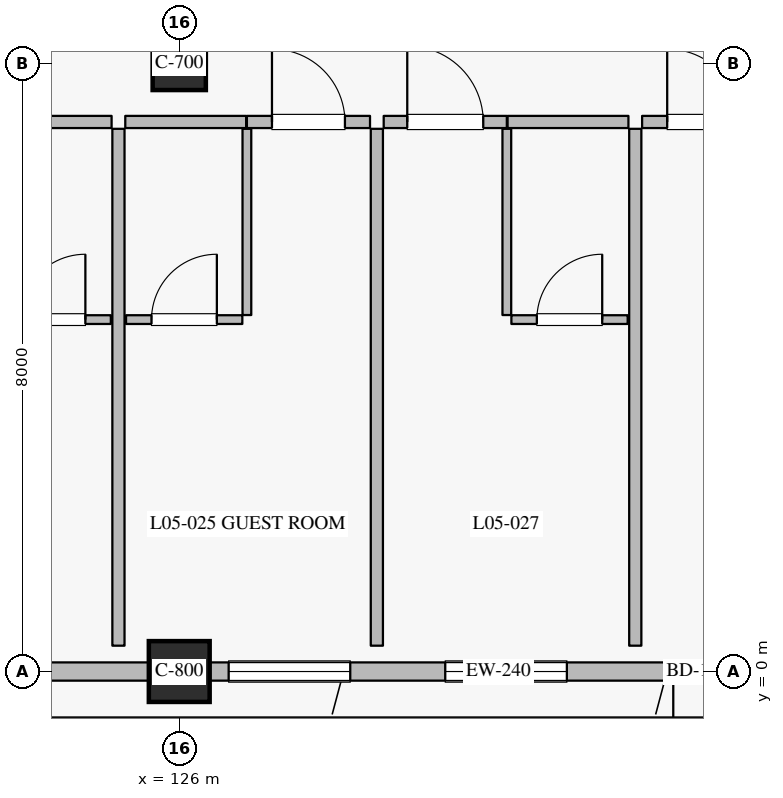
"""IFC4 building model, lengths in metres.
Left out: names, types, materials, properties, quantities, classifications, styles, units other than length and angle.
Written with IfcOpenShell. Run it as: python <this file> out.ifc"""

import sys

from ifc_helpers import new_model, si_unit, direction, frame, frame_2d, origin, origin_2d, place, context, subcontext, project, spatial, rectangle, extrude, element, fill, save


model = new_model("IFC4")
c1 = context("Model", 3, precision=1e-05, world=origin(), true_north=direction((0.0, 1.0)))
c2 = subcontext(c1, "Body", "Model", "MODEL_VIEW")
j1 = project(units=[si_unit("LENGTHUNIT", "METRE"), si_unit("PLANEANGLEUNIT", "RADIAN")], contexts=[c1])
p1 = place(None, origin())
s1 = spatial("IfcSite", under=j1, at=p1, CompositionType="ELEMENT")
p2 = place(p1, origin())
s2 = spatial("IfcBuilding", under=s1, at=p2, CompositionType="ELEMENT")
p3 = place(p2, frame((0.0, 0.0, 25.2)))
s3 = spatial("IfcBuildingStorey", under=s2, at=p3, CompositionType="ELEMENT", Elevation=25.2)
p4 = place(p3, frame((126.0, 0.0, 0.0), z_axis=(0.0, 0.0, 1.0), x_axis=(1.0, 0.0, 0.0)))
e1 = element("IfcColumn", 1, at=p4, inside=s3, PredefinedType="COLUMN", context=c2, shape_type="SweptSolid", body=[
    extrude(rectangle(XDim=0.8, YDim=0.8, at=origin_2d()), origin(), (0.0, 0.0, 1.0), 3.6),
])
p5 = place(p3, frame((126.0, 8.0, 0.0), z_axis=(0.0, 0.0, 1.0), x_axis=(1.0, 0.0, 0.0)))
e2 = element("IfcColumn", 2, at=p5, inside=s3, PredefinedType="COLUMN", context=c2, shape_type="SweptSolid", body=[
    extrude(rectangle(XDim=0.7, YDim=0.7, at=origin_2d()), origin(), (0.0, 0.0, 1.0), 3.6),
])
p6 = place(p3, frame((125.6, 0.0, 0.0), z_axis=(0.0, 0.0, 1.0), x_axis=(-1.0, 0.0, 0.0)))
e3 = element("IfcWall", 3, at=p6, inside=s3, PredefinedType="SOLIDWALL", context=c2, shape_type="SweptSolid", body=[
    extrude(rectangle(XDim=7.6, YDim=0.24, at=frame_2d((3.8, 0.0))), origin(), (0.0, 0.0, 1.0), 2.93),
])
p7 = place(p6, frame((1.35, 0.0, 0.0)))
e4 = element("IfcOpeningElement", 4, at=p7, cuts=e3, PredefinedType="OPENING", context=c2, shape_type="SweptSolid", body=[
    extrude(rectangle(XDim=1.5, YDim=2.25, at=frame_2d((0.75, 1.125))), frame((0.0, 0.13, 0.0), z_axis=(0.0, -1.0, 0.0), x_axis=(1.0, 0.0, 0.0)), (0.0, 0.0, 1.0), 0.26),
])
p8 = place(p6, frame((4.7, 0.0, 0.8)))
e5 = element("IfcOpeningElement", 5, at=p8, cuts=e3, PredefinedType="OPENING", context=c2, shape_type="SweptSolid", body=[
    extrude(rectangle(XDim=1.6, YDim=1.6, at=frame_2d((0.8, 0.8))), frame((0.0, 0.13, 0.0), z_axis=(0.0, -1.0, 0.0), x_axis=(1.0, 0.0, 0.0)), (0.0, 0.0, 1.0), 0.26),
])
p9 = place(p3, frame((134.0, 0.0, 0.0), z_axis=(0.0, 0.0, 1.0), x_axis=(-1.0, 0.0, 0.0)))
e6 = element("IfcWall", 6, at=p9, inside=s3, PredefinedType="SOLIDWALL", context=c2, shape_type="SweptSolid", body=[
    extrude(rectangle(XDim=7.6, YDim=0.24, at=frame_2d((3.8, 0.0))), origin(), (0.0, 0.0, 1.0), 2.93),
])
p10 = place(p9, frame((0.4, 0.0, 0.0)))
e7 = element("IfcOpeningElement", 7, at=p10, cuts=e6, PredefinedType="OPENING", context=c2, shape_type="SweptSolid", body=[
    extrude(rectangle(XDim=1.1, YDim=2.2, at=frame_2d((0.55, 1.1))), frame((0.0, 0.13, 0.0), z_axis=(0.0, -1.0, 0.0), x_axis=(1.0, 0.0, 0.0)), (0.0, 0.0, 1.0), 0.26),
])
p11 = place(p9, frame((2.9, 0.0, 0.8)))
e8 = element("IfcOpeningElement", 8, at=p11, cuts=e6, PredefinedType="OPENING", context=c2, shape_type="SweptSolid", body=[
    extrude(rectangle(XDim=1.6, YDim=1.6, at=frame_2d((0.8, 0.8))), frame((0.0, 0.13, 0.0), z_axis=(0.0, -1.0, 0.0), x_axis=(1.0, 0.0, 0.0)), (0.0, 0.0, 1.0), 0.26),
])
p12 = place(p9, frame((5.75, 0.0, 0.8)))
e9 = element("IfcOpeningElement", 9, at=p12, cuts=e6, PredefinedType="OPENING", context=c2, shape_type="SweptSolid", body=[
    extrude(rectangle(XDim=1.6, YDim=1.6, at=frame_2d((0.8, 0.8))), frame((0.0, 0.13, 0.0), z_axis=(0.0, -1.0, 0.0), x_axis=(1.0, 0.0, 0.0)), (0.0, 0.0, 1.0), 0.26),
])
p13 = place(p3, frame((123.52, 7.23, 0.0), z_axis=(0.0, 0.0, 1.0), x_axis=(1.0, 0.0, 0.0)))
e10 = element("IfcWall", 10, at=p13, inside=s3, PredefinedType="PARTITIONING", context=c2, shape_type="SweptSolid", body=[
    extrude(rectangle(XDim=1.59, YDim=0.16, at=frame_2d((0.795, 0.0))), origin(), (0.0, 0.0, 1.0), 3.335),
])
p14 = place(p3, frame((123.57, 4.63, 0.0), z_axis=(0.0, 0.0, 1.0), x_axis=(1.0, 0.0, 0.0)))
e11 = element("IfcWall", 11, at=p14, inside=s3, PredefinedType="PARTITIONING", context=c2, shape_type="SweptSolid", body=[
    extrude(rectangle(XDim=1.53, YDim=0.115, at=frame_2d((0.765, 0.0))), origin(), (0.0, 0.0, 1.0), 3.335),
])
p15 = place(p14, frame((0.335, 0.0, 0.0)))
e12 = element("IfcOpeningElement", 12, at=p15, cuts=e11, PredefinedType="OPENING", context=c2, shape_type="SweptSolid", body=[
    extrude(rectangle(XDim=0.86, YDim=2.12, at=frame_2d((0.43, 1.06))), frame((0.0, 0.067, 0.0), z_axis=(0.0, -1.0, 0.0), x_axis=(1.0, 0.0, 0.0)), (0.0, 0.0, 1.0), 0.135),
])
p16 = place(p3, frame((125.29, 7.23, 0.0), z_axis=(0.0, 0.0, 1.0), x_axis=(1.0, 0.0, 0.0)))
e13 = element("IfcWall", 13, at=p16, inside=s3, PredefinedType="PARTITIONING", context=c2, shape_type="SweptSolid", body=[
    extrude(rectangle(XDim=1.59, YDim=0.16, at=frame_2d((0.795, 0.0))), origin(), (0.0, 0.0, 1.0), 3.335),
])
p17 = place(p3, frame((126.89, 7.23, 0.0), z_axis=(0.0, 0.0, 1.0), x_axis=(1.0, 0.0, 0.0)))
e14 = element("IfcWall", 14, at=p17, inside=s3, PredefinedType="PARTITIONING", context=c2, shape_type="SweptSolid", body=[
    extrude(rectangle(XDim=1.62, YDim=0.16, at=frame_2d((0.81, 0.0))), origin(), (0.0, 0.0, 1.0), 3.335),
])
p18 = place(p17, frame((0.33, 0.0, 0.0)))
e15 = element("IfcOpeningElement", 15, at=p18, cuts=e14, PredefinedType="OPENING", context=c2, shape_type="SweptSolid", body=[
    extrude(rectangle(XDim=0.96, YDim=2.2, at=frame_2d((0.48, 1.1))), frame((0.0, 0.09, 0.0), z_axis=(0.0, -1.0, 0.0), x_axis=(1.0, 0.0, 0.0)), (0.0, 0.0, 1.0), 0.18),
])
p19 = place(p3, frame((126.89, 4.69, 0.0), z_axis=(0.0, 0.0, 1.0), x_axis=(0.0, 1.0, 0.0)))
e16 = element("IfcWall", 16, at=p19, inside=s3, PredefinedType="PARTITIONING", context=c2, shape_type="SweptSolid", body=[
    extrude(rectangle(XDim=2.45, YDim=0.115, at=frame_2d((1.225, 0.0))), origin(), (0.0, 0.0, 1.0), 3.335),
])
p20 = place(p3, frame((125.3, 4.63, 0.0), z_axis=(0.0, 0.0, 1.0), x_axis=(1.0, 0.0, 0.0)))
e17 = element("IfcWall", 17, at=p20, inside=s3, PredefinedType="PARTITIONING", context=c2, shape_type="SweptSolid", body=[
    extrude(rectangle(XDim=1.53, YDim=0.115, at=frame_2d((0.765, 0.0))), origin(), (0.0, 0.0, 1.0), 3.335),
])
p21 = place(p20, frame((0.335, 0.0, 0.0)))
e18 = element("IfcOpeningElement", 18, at=p21, cuts=e17, PredefinedType="OPENING", context=c2, shape_type="SweptSolid", body=[
    extrude(rectangle(XDim=0.86, YDim=2.12, at=frame_2d((0.43, 1.06))), frame((0.0, 0.067, 0.0), z_axis=(0.0, -1.0, 0.0), x_axis=(1.0, 0.0, 0.0)), (0.0, 0.0, 1.0), 0.135),
])
p22 = place(p3, frame((125.2, 0.34, 0.0), z_axis=(0.0, 0.0, 1.0), x_axis=(0.0, 1.0, 0.0)))
e19 = element("IfcWall", 19, at=p22, inside=s3, PredefinedType="PARTITIONING", context=c2, shape_type="SweptSolid", body=[
    extrude(rectangle(XDim=6.8, YDim=0.16, at=frame_2d((3.4, 0.0))), origin(), (0.0, 0.0, 1.0), 3.335),
])
p23 = place(p3, frame((128.69, 7.23, 0.0), z_axis=(0.0, 0.0, 1.0), x_axis=(1.0, 0.0, 0.0)))
e20 = element("IfcWall", 20, at=p23, inside=s3, PredefinedType="PARTITIONING", context=c2, shape_type="SweptSolid", body=[
    extrude(rectangle(XDim=1.62, YDim=0.16, at=frame_2d((0.81, 0.0))), origin(), (0.0, 0.0, 1.0), 3.335),
])
p24 = place(p23, frame((0.31, 0.0, 0.0)))
e21 = element("IfcOpeningElement", 21, at=p24, cuts=e20, PredefinedType="OPENING", context=c2, shape_type="SweptSolid", body=[
    extrude(rectangle(XDim=1.0, YDim=2.25, at=frame_2d((0.5, 1.125))), frame((0.0, 0.09, 0.0), z_axis=(0.0, -1.0, 0.0), x_axis=(1.0, 0.0, 0.0)), (0.0, 0.0, 1.0), 0.18),
])
p25 = place(p3, frame((130.32, 7.23, 0.0), z_axis=(0.0, 0.0, 1.0), x_axis=(1.0, 0.0, 0.0)))
e22 = element("IfcWall", 22, at=p25, inside=s3, PredefinedType="PARTITIONING", context=c2, shape_type="SweptSolid", body=[
    extrude(rectangle(XDim=1.59, YDim=0.16, at=frame_2d((0.795, 0.0))), origin(), (0.0, 0.0, 1.0), 3.335),
])
p26 = place(p3, frame((130.31, 4.69, 0.0), z_axis=(0.0, 0.0, 1.0), x_axis=(0.0, 1.0, 0.0)))
e23 = element("IfcWall", 23, at=p26, inside=s3, PredefinedType="PARTITIONING", context=c2, shape_type="SweptSolid", body=[
    extrude(rectangle(XDim=2.45, YDim=0.115, at=frame_2d((1.225, 0.0))), origin(), (0.0, 0.0, 1.0), 3.335),
])
p27 = place(p3, frame((130.37, 4.63, 0.0), z_axis=(0.0, 0.0, 1.0), x_axis=(1.0, 0.0, 0.0)))
e24 = element("IfcWall", 24, at=p27, inside=s3, PredefinedType="PARTITIONING", context=c2, shape_type="SweptSolid", body=[
    extrude(rectangle(XDim=1.53, YDim=0.115, at=frame_2d((0.765, 0.0))), origin(), (0.0, 0.0, 1.0), 3.335),
])
p28 = place(p27, frame((0.335, 0.0, 0.0)))
e25 = element("IfcOpeningElement", 25, at=p28, cuts=e24, PredefinedType="OPENING", context=c2, shape_type="SweptSolid", body=[
    extrude(rectangle(XDim=0.86, YDim=2.12, at=frame_2d((0.43, 1.06))), frame((0.0, 0.067, 0.0), z_axis=(0.0, -1.0, 0.0), x_axis=(1.0, 0.0, 0.0)), (0.0, 0.0, 1.0), 0.135),
])
p29 = place(p3, frame((128.6, 0.34, 0.0), z_axis=(0.0, 0.0, 1.0), x_axis=(0.0, 1.0, 0.0)))
e26 = element("IfcWall", 26, at=p29, inside=s3, PredefinedType="PARTITIONING", context=c2, shape_type="SweptSolid", body=[
    extrude(rectangle(XDim=6.8, YDim=0.16, at=frame_2d((3.4, 0.0))), origin(), (0.0, 0.0, 1.0), 3.335),
])
p30 = place(p3, frame((132.09, 7.23, 0.0), z_axis=(0.0, 0.0, 1.0), x_axis=(1.0, 0.0, 0.0)))
e27 = element("IfcWall", 27, at=p30, inside=s3, PredefinedType="PARTITIONING", context=c2, shape_type="SweptSolid", body=[
    extrude(rectangle(XDim=1.62, YDim=0.16, at=frame_2d((0.81, 0.0))), origin(), (0.0, 0.0, 1.0), 3.335),
])
p31 = place(p30, frame((0.33, 0.0, 0.0)))
e28 = element("IfcOpeningElement", 28, at=p31, cuts=e27, PredefinedType="OPENING", context=c2, shape_type="SweptSolid", body=[
    extrude(rectangle(XDim=0.96, YDim=2.2, at=frame_2d((0.48, 1.1))), frame((0.0, 0.09, 0.0), z_axis=(0.0, -1.0, 0.0), x_axis=(1.0, 0.0, 0.0)), (0.0, 0.0, 1.0), 0.18),
])
p32 = place(p3, frame((132.0, 0.34, 0.0), z_axis=(0.0, 0.0, 1.0), x_axis=(0.0, 1.0, 0.0)))
e29 = element("IfcWall", 29, at=p32, inside=s3, PredefinedType="PARTITIONING", context=c2, shape_type="SweptSolid", body=[
    extrude(rectangle(XDim=6.8, YDim=0.16, at=frame_2d((3.4, 0.0))), origin(), (0.0, 0.0, 1.0), 3.335),
])
p33 = place(p10, origin())
e30 = element("IfcDoor", 30, at=p33, inside=s3, OperationType="SINGLE_SWING_RIGHT", PredefinedType="DOOR", context=c2, shape_type="SweptSolid", body=[
    extrude(rectangle(XDim=1.1, YDim=2.2, at=frame_2d((0.55, 1.1))), frame((0.0, 0.025, 0.0), z_axis=(0.0, -1.0, 0.0), x_axis=(1.0, 0.0, 0.0)), (0.0, 0.0, 1.0), 0.05),
])
fill(e7, e30)
p34 = place(p11, origin())
e31 = element("IfcWindow", 31, at=p34, inside=s3, PartitioningType="SINGLE_PANEL", PredefinedType="WINDOW", context=c2, shape_type="SweptSolid", body=[
    extrude(rectangle(XDim=1.6, YDim=1.6, at=frame_2d((0.8, 0.8))), frame((0.0, 0.03, 0.0), z_axis=(0.0, -1.0, 0.0), x_axis=(1.0, 0.0, 0.0)), (0.0, 0.0, 1.0), 0.06),
])
fill(e8, e31)
p35 = place(p12, origin())
e32 = element("IfcWindow", 32, at=p35, inside=s3, PartitioningType="SINGLE_PANEL", PredefinedType="WINDOW", context=c2, shape_type="SweptSolid", body=[
    extrude(rectangle(XDim=1.6, YDim=1.6, at=frame_2d((0.8, 0.8))), frame((0.0, 0.03, 0.0), z_axis=(0.0, -1.0, 0.0), x_axis=(1.0, 0.0, 0.0)), (0.0, 0.0, 1.0), 0.06),
])
fill(e9, e32)
p36 = place(p15, origin())
e33 = element("IfcDoor", 33, at=p36, inside=s3, OperationType="SINGLE_SWING_RIGHT", PredefinedType="DOOR", context=c2, shape_type="SweptSolid", body=[
    extrude(rectangle(XDim=0.86, YDim=2.12, at=frame_2d((0.43, 1.06))), frame((0.0, 0.025, 0.0), z_axis=(0.0, -1.0, 0.0), x_axis=(1.0, 0.0, 0.0)), (0.0, 0.0, 1.0), 0.05),
])
fill(e12, e33)
p37 = place(p18, origin())
e34 = element("IfcDoor", 34, at=p37, inside=s3, OperationType="SINGLE_SWING_LEFT", PredefinedType="DOOR", context=c2, shape_type="SweptSolid", body=[
    extrude(rectangle(XDim=0.96, YDim=2.2, at=frame_2d((0.48, 1.1))), frame((0.0, 0.025, 0.0), z_axis=(0.0, -1.0, 0.0), x_axis=(1.0, 0.0, 0.0)), (0.0, 0.0, 1.0), 0.05),
])
fill(e15, e34)
p38 = place(p21, origin())
e35 = element("IfcDoor", 35, at=p38, inside=s3, OperationType="SINGLE_SWING_RIGHT", PredefinedType="DOOR", context=c2, shape_type="SweptSolid", body=[
    extrude(rectangle(XDim=0.86, YDim=2.12, at=frame_2d((0.43, 1.06))), frame((0.0, 0.025, 0.0), z_axis=(0.0, -1.0, 0.0), x_axis=(1.0, 0.0, 0.0)), (0.0, 0.0, 1.0), 0.05),
])
fill(e18, e35)
p39 = place(p24, origin())
e36 = element("IfcDoor", 36, at=p39, inside=s3, OperationType="SINGLE_SWING_LEFT", PredefinedType="DOOR", context=c2, shape_type="SweptSolid", body=[
    extrude(rectangle(XDim=1.0, YDim=2.25, at=frame_2d((0.5, 1.125))), frame((0.0, 0.025, 0.0), z_axis=(0.0, -1.0, 0.0), x_axis=(1.0, 0.0, 0.0)), (0.0, 0.0, 1.0), 0.05),
])
fill(e21, e36)
p40 = place(p28, origin())
e37 = element("IfcDoor", 37, at=p40, inside=s3, OperationType="SINGLE_SWING_RIGHT", PredefinedType="DOOR", context=c2, shape_type="SweptSolid", body=[
    extrude(rectangle(XDim=0.86, YDim=2.12, at=frame_2d((0.43, 1.06))), frame((0.0, 0.025, 0.0), z_axis=(0.0, -1.0, 0.0), x_axis=(1.0, 0.0, 0.0)), (0.0, 0.0, 1.0), 0.05),
])
fill(e25, e37)
p41 = place(p31, origin())
e38 = element("IfcDoor", 38, at=p41, inside=s3, OperationType="SINGLE_SWING_LEFT", PredefinedType="DOOR", context=c2, shape_type="SweptSolid", body=[
    extrude(rectangle(XDim=0.96, YDim=2.2, at=frame_2d((0.48, 1.1))), frame((0.0, 0.025, 0.0), z_axis=(0.0, -1.0, 0.0), x_axis=(1.0, 0.0, 0.0)), (0.0, 0.0, 1.0), 0.05),
])
fill(e28, e38)
save(model, sys.argv[1])
